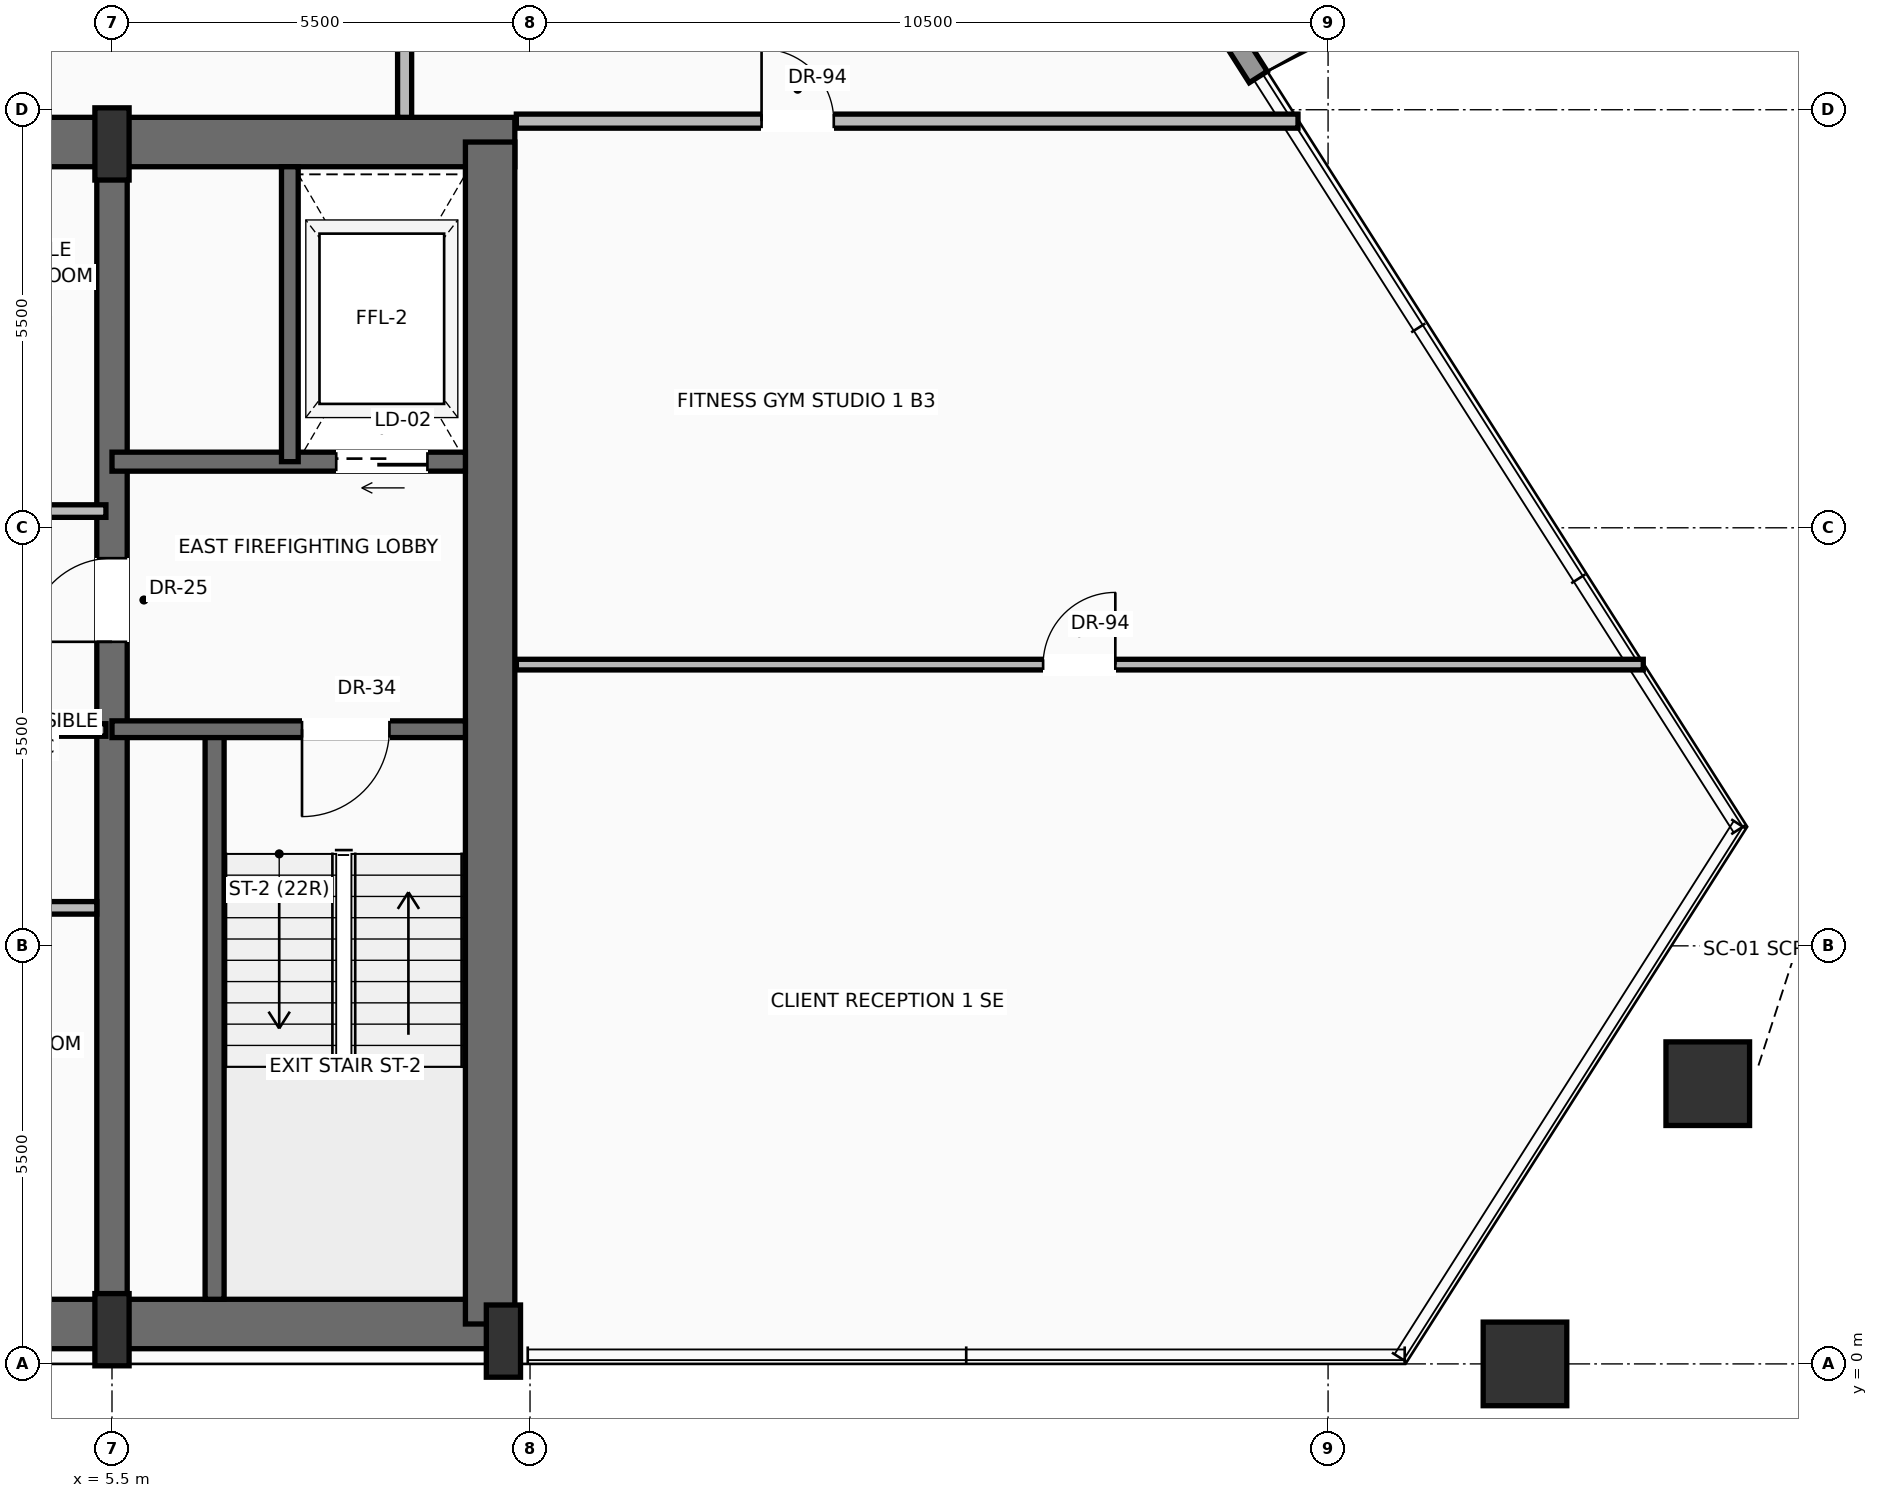
"""IFC4 building model, lengths in metres.
Left out: names, types, materials, properties, quantities, classifications, styles, units other than length and angle.
Written with IfcOpenShell. Run it as: python <this file> out.ifc"""

import sys

from ifc_helpers import new_model, si_unit, direction, frame, frame_2d, origin, origin_2d, place, context, subcontext, project, spatial, rectangle, hollow_rectangle, extrude, source, transform, mapped, element, fill, save


model = new_model("IFC4")
c1 = context("Model", 3, precision=1e-05, world=origin(), true_north=direction((0.0, 1.0)))
c2 = subcontext(c1, "Body", "Model", "MODEL_VIEW")
j1 = project(units=[si_unit("LENGTHUNIT", "METRE"), si_unit("PLANEANGLEUNIT", "RADIAN")], contexts=[c1])
p1 = place(None, origin())
s1 = spatial("IfcSite", under=j1, at=p1, CompositionType="ELEMENT")
p2 = place(p1, origin())
s2 = spatial("IfcBuilding", under=s1, at=p2, CompositionType="ELEMENT")
p3 = place(p2, frame((0.0, 0.0, 162.6)))
s3 = spatial("IfcBuildingStorey", under=s2, at=p3, CompositionType="ELEMENT", Elevation=162.6)
p4 = place(p3, frame((-10.65, 0.525, 0.0), z_axis=(0.0, 0.0, 1.0), x_axis=(1.0, 0.0, 0.0)))
e1 = element("IfcWall", 1, at=p4, inside=s3, PredefinedType="SHEAR", context=c2, shape_type="SweptSolid", body=[
    extrude(rectangle(XDim=21.3, YDim=0.65, at=frame_2d((10.65, 0.0))), origin(), (0.0, 0.0, 1.0), 3.4),
])
p5 = place(p3, frame((-10.8, 16.075, 0.0), z_axis=(0.0, 0.0, 1.0), x_axis=(1.0, 0.0, 0.0)))
e2 = element("IfcWall", 2, at=p5, inside=s3, PredefinedType="SHEAR", context=c2, shape_type="SweptSolid", body=[
    extrude(rectangle(XDim=21.6, YDim=0.65, at=frame_2d((10.8, 0.0))), origin(), (0.0, 0.0, 1.0), 3.4),
])
p6 = place(p5, frame((3.37, 0.0, 0.0)))
e3 = element("IfcOpeningElement", 3, at=p6, cuts=e2, PredefinedType="OPENING", context=c2, shape_type="SweptSolid", body=[
    extrude(rectangle(XDim=1.3, YDim=2.3, at=frame_2d((0.65, 1.15))), frame((0.0, 0.335, 0.0), z_axis=(0.0, -1.0, 0.0), x_axis=(1.0, 0.0, 0.0)), (0.0, 0.0, 1.0), 0.67),
])
p7 = place(p5, frame((9.8, 0.0, 0.0)))
e4 = element("IfcOpeningElement", 4, at=p7, cuts=e2, PredefinedType="OPENING", context=c2, shape_type="SweptSolid", body=[
    extrude(rectangle(XDim=2.0, YDim=2.4, at=frame_2d((1.0, 1.2))), frame((0.0, 0.335, 0.0), z_axis=(0.0, -1.0, 0.0), x_axis=(1.0, 0.0, 0.0)), (0.0, 0.0, 1.0), 0.67),
])
p8 = place(p3, frame((10.475, 0.525, 0.0), z_axis=(0.0, 0.0, 1.0), x_axis=(0.0, 1.0, 0.0)))
e5 = element("IfcWall", 5, at=p8, inside=s3, PredefinedType="SHEAR", context=c2, shape_type="SweptSolid", body=[
    extrude(rectangle(XDim=15.55, YDim=0.65, at=frame_2d((7.775, 0.0))), origin(), (0.0, 0.0, 1.0), 3.4),
])
p9 = place(p3, frame((5.5, 0.525, 0.0), z_axis=(0.0, 0.0, 1.0), x_axis=(0.0, 1.0, 0.0)))
e6 = element("IfcWall", 6, at=p9, inside=s3, PredefinedType="SHEAR", context=c2, shape_type="SweptSolid", body=[
    extrude(rectangle(XDim=15.55, YDim=0.4, at=frame_2d((7.775, 0.0))), origin(), (0.0, 0.0, 1.0), 3.4),
])
p10 = place(p9, frame((8.975, 0.0, 0.0)))
e7 = element("IfcOpeningElement", 7, at=p10, cuts=e6, PredefinedType="OPENING", context=c2, shape_type="SweptSolid", body=[
    extrude(rectangle(XDim=1.1, YDim=2.2, at=frame_2d((0.55, 1.1))), frame((0.0, 0.21, 0.0), z_axis=(0.0, -1.0, 0.0), x_axis=(1.0, 0.0, 0.0)), (0.0, 0.0, 1.0), 0.42),
])
m1 = source(origin(), c2, "Body", "SweptSolid", [
    extrude(rectangle(XDim=0.45, YDim=0.95, at=origin_2d()), origin(), (0.0, 0.0, 1.0), 3.7),
])
for number, where, z_axis, x_axis in (
    (8, (5.5, 0.45, 0.0), (0.0, 0.0, 1.0), (1.0, 0.0, 0.0)),
    (9, (10.65, 0.3, 0.0), (0.0, 0.0, 1.0), (1.0, 0.0, 0.0)),
    (10, (5.5, 16.05, 0.0), (0.0, 0.0, 1.0), (1.0, 0.0, 0.0)),
):
    element("IfcColumn", number, at=place(p3, frame(where, z_axis=z_axis, x_axis=x_axis)), inside=s3, PredefinedType="PILASTER", context=c2, shape_type="MappedRepresentation", body=[
        mapped(m1, transform((0.0, 0.0, 0.0), scale=1.0)),
    ])
m2 = source(origin(), c2, "Body", "SweptSolid", [
    extrude(hollow_rectangle(XDim=1.1, YDim=1.1, WallThickness=0.055, at=origin_2d()), origin(), (0.0, 0.0, 1.0), 3.691),
])
p11 = place(p3, frame((24.091, 0.0, 0.004), z_axis=(0.007010873397, 0.0, 0.999975423525), x_axis=(0.0, 1.0, 0.0)))
e11 = element("IfcColumn", 11, at=p11, inside=s3, PredefinedType="COLUMN", context=c2, shape_type="MappedRepresentation", body=[
    mapped(m2, transform((0.0, 0.0, 0.0), scale=1.0)),
])
m3 = source(origin(), c2, "Body", "SweptSolid", [
    extrude(hollow_rectangle(XDim=1.1, YDim=1.1, WallThickness=0.055, at=origin_2d()), origin(), (0.0, 0.0, 1.0), 3.692),
])
p12 = place(p3, frame((26.496, 3.687, 0.004), z_axis=(-0.004960025495, -0.01501234383, 0.999875006028), x_axis=(0.949516556765, -0.313716924041, 0.0)))
e12 = element("IfcColumn", 12, at=p12, inside=s3, PredefinedType="COLUMN", context=c2, shape_type="MappedRepresentation", body=[
    mapped(m3, transform((0.0, 0.0, 0.0), scale=1.0)),
])
p13 = place(p3, frame((10.658, 32.549, 0.0), z_axis=(0.0, 0.0, 1.0), x_axis=(0.536276914683, -0.844042102491, 0.0)))
e13 = element("IfcWall", 13, at=p13, inside=s3, PredefinedType="SOLIDWALL", context=c2, shape_type="SweptSolid", body=[
    extrude(rectangle(XDim=18.505, YDim=0.28, at=frame_2d((9.252, 0.0))), origin(), (0.0, 0.0, 1.0), 2.98),
])
p14 = place(p13, frame((4.441, 0.0, 0.0)))
e14 = element("IfcOpeningElement", 14, at=p14, cuts=e13, PredefinedType="OPENING", context=c2, shape_type="SweptSolid", body=[
    extrude(rectangle(XDim=1.6, YDim=2.35, at=frame_2d((0.8, 1.175))), frame((0.0, 0.15, 0.0), z_axis=(0.0, -1.0, 0.0), x_axis=(1.0, 0.0, 0.0)), (0.0, 0.0, 1.0), 0.3),
])
p15 = place(p13, frame((12.583, 0.0, 0.9)))
e15 = element("IfcOpeningElement", 15, at=p15, cuts=e13, PredefinedType="OPENING", context=c2, shape_type="SweptSolid", body=[
    extrude(rectangle(XDim=1.55, YDim=1.85, at=frame_2d((0.775, 0.925))), frame((0.0, 0.15, 0.0), z_axis=(0.0, -1.0, 0.0), x_axis=(1.0, 0.0, 0.0)), (0.0, 0.0, 1.0), 0.3),
])
p16 = place(p3, frame((6.85, 0.85, 0.0), z_axis=(0.0, 0.0, 1.0), x_axis=(0.0, 1.0, 0.0)))
e16 = element("IfcWall", 16, at=p16, inside=s3, PredefinedType="SOLIDWALL", context=c2, shape_type="SweptSolid", body=[
    extrude(rectangle(XDim=7.5, YDim=0.25, at=frame_2d((3.75, 0.0))), origin(), (0.0, 0.0, 1.0), 3.4),
])
p17 = place(p3, frame((10.15, 8.35, 0.0), z_axis=(0.0, 0.0, 1.0), x_axis=(-1.0, 0.0, 0.0)))
e17 = element("IfcWall", 17, at=p17, inside=s3, PredefinedType="SOLIDWALL", context=c2, shape_type="SweptSolid", body=[
    extrude(rectangle(XDim=4.65, YDim=0.22, at=frame_2d((2.325, 0.0))), origin(), (0.0, 0.0, 1.0), 3.4),
])
p18 = place(p17, frame((1.0, 0.0, 0.0)))
e18 = element("IfcOpeningElement", 18, at=p18, cuts=e17, PredefinedType="OPENING", context=c2, shape_type="SweptSolid", body=[
    extrude(rectangle(XDim=1.15, YDim=2.2, at=frame_2d((0.575, 1.1))), frame((0.0, 0.12, 0.0), z_axis=(0.0, -1.0, 0.0), x_axis=(1.0, 0.0, 0.0)), (0.0, 0.0, 1.0), 0.24),
])
p19 = place(p3, frame((10.15, 11.87, 0.0), z_axis=(0.0, 0.0, 1.0), x_axis=(-1.0, 0.0, 0.0)))
e19 = element("IfcWall", 19, at=p19, inside=s3, PredefinedType="SOLIDWALL", context=c2, shape_type="SweptSolid", body=[
    extrude(rectangle(XDim=4.65, YDim=0.25, at=frame_2d((2.325, 0.0))), origin(), (0.0, 0.0, 1.0), 3.4),
])
p20 = place(p19, frame((0.5, 0.0, 0.0)))
e20 = element("IfcOpeningElement", 20, at=p20, cuts=e19, PredefinedType="OPENING", context=c2, shape_type="SweptSolid", body=[
    extrude(rectangle(XDim=1.2, YDim=2.25, at=frame_2d((0.6, 1.125))), frame((0.0, 0.135, 0.0), z_axis=(0.0, -1.0, 0.0), x_axis=(1.0, 0.0, 0.0)), (0.0, 0.0, 1.0), 0.27),
])
p21 = place(p3, frame((7.84, 11.87, 0.0), z_axis=(0.0, 0.0, 1.0), x_axis=(0.0, 1.0, 0.0)))
e21 = element("IfcWall", 21, at=p21, inside=s3, PredefinedType="SOLIDWALL", context=c2, shape_type="SweptSolid", body=[
    extrude(rectangle(XDim=3.88, YDim=0.22, at=frame_2d((1.94, 0.0))), origin(), (0.0, 0.0, 1.0), 3.4),
])
p22 = place(p3, frame((1.82, 6.0, 0.0), z_axis=(0.0, 0.0, 1.0), x_axis=(1.0, 0.0, 0.0)))
e22 = element("IfcWall", 22, at=p22, inside=s3, PredefinedType="PARTITIONING", context=c2, shape_type="SweptSolid", body=[
    extrude(rectangle(XDim=3.48, YDim=0.165, at=frame_2d((1.74, 0.0))), origin(), (0.0, 0.0, 1.0), 3.392),
])
p23 = place(p22, frame((0.38, 0.0, 0.0)))
e23 = element("IfcOpeningElement", 23, at=p23, cuts=e22, PredefinedType="OPENING", context=c2, shape_type="SweptSolid", body=[
    extrude(rectangle(XDim=0.9, YDim=2.1, at=frame_2d((0.45, 1.05))), frame((0.0, 0.093, 0.0), z_axis=(0.0, -1.0, 0.0), x_axis=(1.0, 0.0, 0.0)), (0.0, 0.0, 1.0), 0.185),
])
for number, where, z_axis, x_axis in (
    (24, (3.54, 8.34, 0.0), (0.0, 0.0, 1.0), (1.0, 0.0, 0.0)),
    (25, (3.54, 11.22, 0.0), (0.0, 0.0, 1.0), (1.0, 0.0, 0.0)),
):
    element("IfcWall", number, at=place(p3, frame(where, z_axis=z_axis, x_axis=x_axis)), inside=s3, PredefinedType="PARTITIONING", context=c2, shape_type="SweptSolid", body=[
        extrude(rectangle(XDim=1.88, YDim=0.165, at=frame_2d((0.94, 0.0))), origin(), (0.0, 0.0, 1.0), 3.392),
    ])
p24 = place(p3, frame((9.35, 16.4, 0.0), z_axis=(0.0, 0.0, 1.0), x_axis=(0.0, 1.0, 0.0)))
e26 = element("IfcWall", 26, at=p24, inside=s3, PredefinedType="PARTITIONING", context=c2, shape_type="SweptSolid", body=[
    extrude(rectangle(XDim=7.8, YDim=0.185, at=frame_2d((3.9, 0.0))), origin(), (0.0, 0.0, 1.0), 3.392),
])
p25 = place(p24, frame((3.781, 0.0, 0.0)))
e27 = element("IfcOpeningElement", 27, at=p25, cuts=e26, PredefinedType="OPENING", context=c2, shape_type="SweptSolid", body=[
    extrude(rectangle(XDim=0.95, YDim=2.2, at=frame_2d((0.475, 1.1))), frame((0.0, 0.103, 0.0), z_axis=(0.0, -1.0, 0.0), x_axis=(1.0, 0.0, 0.0)), (0.0, 0.0, 1.0), 0.205),
])
p26 = place(p3, frame((10.82, 16.35, 0.0), z_axis=(0.0, 0.0, 1.0), x_axis=(1.0, 0.0, 0.0)))
e28 = element("IfcWall", 28, at=p26, inside=s3, PredefinedType="PARTITIONING", context=c2, shape_type="SweptSolid", body=[
    extrude(rectangle(XDim=10.284, YDim=0.185, at=frame_2d((5.142, 0.0))), origin(), (0.0, 0.0, 1.0), 3.392),
])
p27 = place(p26, frame((3.227, 0.0, 0.0)))
e29 = element("IfcOpeningElement", 29, at=p27, cuts=e28, PredefinedType="OPENING", context=c2, shape_type="SweptSolid", body=[
    extrude(rectangle(XDim=0.95, YDim=2.2, at=frame_2d((0.475, 1.1))), frame((0.0, 0.103, 0.0), z_axis=(0.0, -1.0, 0.0), x_axis=(1.0, 0.0, 0.0)), (0.0, 0.0, 1.0), 0.205),
])
p28 = place(p3, frame((10.82, 9.2, 0.0), z_axis=(0.0, 0.0, 1.0), x_axis=(1.0, 0.0, 0.0)))
e30 = element("IfcWall", 30, at=p28, inside=s3, PredefinedType="PARTITIONING", context=c2, shape_type="SweptSolid", body=[
    extrude(rectangle(XDim=14.827, YDim=0.14, at=frame_2d((7.414, 0.0))), origin(), (0.0, 0.0, 1.0), 3.392),
])
p29 = place(p28, frame((6.931, 0.0, 0.0)))
e31 = element("IfcOpeningElement", 31, at=p29, cuts=e30, PredefinedType="OPENING", context=c2, shape_type="SweptSolid", body=[
    extrude(rectangle(XDim=0.95, YDim=2.2, at=frame_2d((0.475, 1.1))), frame((0.0, 0.08, 0.0), z_axis=(0.0, -1.0, 0.0), x_axis=(1.0, 0.0, 0.0)), (0.0, 0.0, 1.0), 0.16),
])
m4 = source(origin(), c2, "Body", "SweptSolid", [
    extrude(rectangle(XDim=1.15, YDim=2.2, at=frame_2d((0.575, 1.1))), frame((0.0, 0.025, 0.0), z_axis=(0.0, -1.0, 0.0), x_axis=(1.0, 0.0, 0.0)), (0.0, 0.0, 1.0), 0.05),
])
p30 = place(p18, origin())
e32 = element("IfcDoor", 32, at=p30, inside=s3, OperationType="SINGLE_SWING_RIGHT", PredefinedType="DOOR", context=c2, shape_type="MappedRepresentation", body=[
    mapped(m4, transform((0.0, 0.0, 0.0), scale=1.0)),
])
fill(e18, e32)
m5 = source(origin(), c2, "Body", "SweptSolid", [
    extrude(rectangle(XDim=1.1, YDim=2.2, at=frame_2d((0.55, 1.1))), frame((0.0, 0.025, 0.0), z_axis=(0.0, -1.0, 0.0), x_axis=(1.0, 0.0, 0.0)), (0.0, 0.0, 1.0), 0.05),
])
p31 = place(p10, origin())
e33 = element("IfcDoor", 33, at=p31, inside=s3, OperationType="SINGLE_SWING_LEFT", PredefinedType="DOOR", context=c2, shape_type="MappedRepresentation", body=[
    mapped(m5, transform((0.0, 0.0, 0.0), scale=1.0)),
])
fill(e7, e33)
m6 = source(origin(), c2, "Body", "SweptSolid", [
    extrude(rectangle(XDim=1.2, YDim=2.25, at=frame_2d((0.6, 1.125))), frame((0.0, 0.025, 0.0), z_axis=(0.0, -1.0, 0.0), x_axis=(1.0, 0.0, 0.0)), (0.0, 0.0, 1.0), 0.05),
])
p32 = place(p20, origin())
e34 = element("IfcDoor", 34, at=p32, inside=s3, OperationType="SLIDING_TO_RIGHT", PredefinedType="DOOR", context=c2, shape_type="MappedRepresentation", body=[
    mapped(m6, transform((0.0, 0.0, 0.0), scale=1.0)),
])
fill(e20, e34)
m7 = source(origin(), c2, "Body", "SweptSolid", [
    extrude(rectangle(XDim=0.95, YDim=2.2, at=frame_2d((0.475, 1.1))), frame((0.0, 0.025, 0.0), z_axis=(0.0, -1.0, 0.0), x_axis=(1.0, 0.0, 0.0)), (0.0, 0.0, 1.0), 0.05),
])
p33 = place(p27, origin())
e35 = element("IfcDoor", 35, at=p33, inside=s3, OperationType="SINGLE_SWING_LEFT", PredefinedType="DOOR", context=c2, shape_type="MappedRepresentation", body=[
    mapped(m7, transform((0.0, 0.0, 0.0), scale=1.0)),
])
fill(e29, e35)
p34 = place(p29, origin())
e36 = element("IfcDoor", 36, at=p34, inside=s3, OperationType="SINGLE_SWING_RIGHT", PredefinedType="DOOR", context=c2, shape_type="MappedRepresentation", body=[
    mapped(m7, transform((0.0, 0.0, 0.0), scale=1.0)),
])
fill(e31, e36)
save(model, sys.argv[1])
